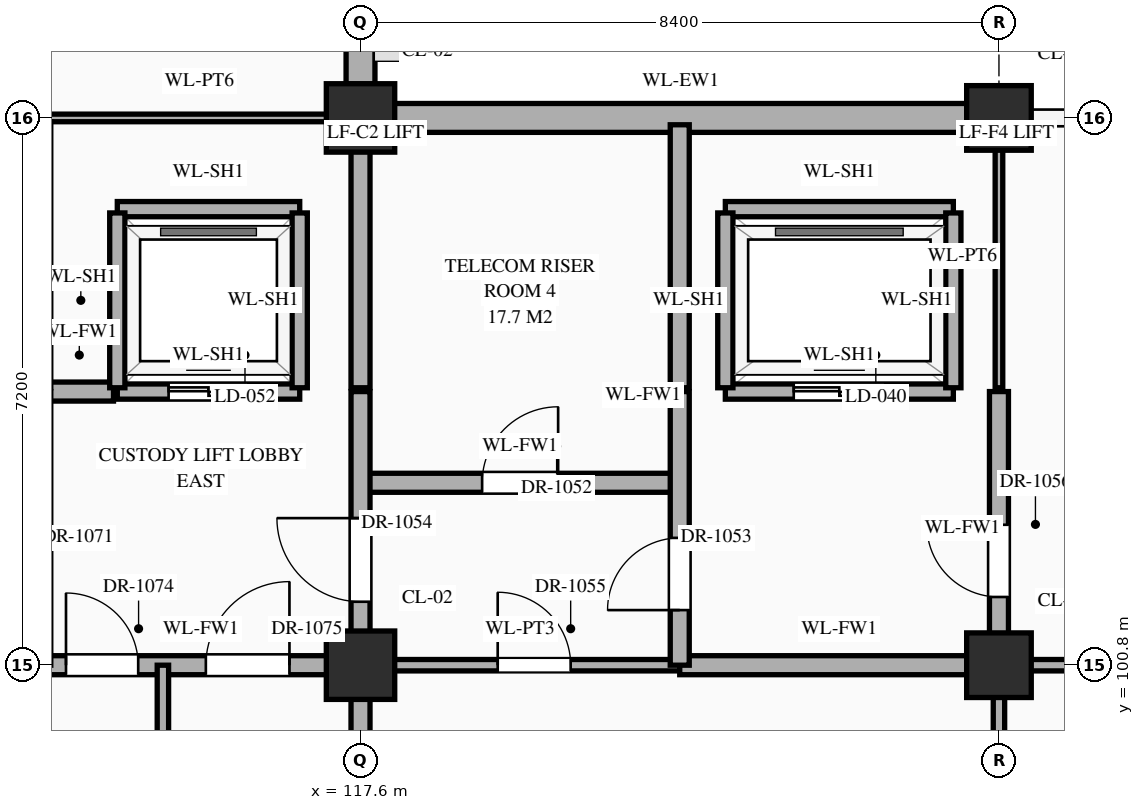
"""IFC4 building model, lengths in metres.
Left out: names, types, materials, properties, quantities, classifications, styles, units other than length and angle.
Written with IfcOpenShell. Run it as: python <this file> out.ifc"""

import sys

from ifc_helpers import new_model, si_unit, direction, frame, frame_2d, origin, origin_2d, place, context, subcontext, project, spatial, rectangle, extrude, element, fill, save


model = new_model("IFC4")
c1 = context("Model", 3, precision=1e-05, world=origin(), true_north=direction((0.0, 1.0)))
c2 = subcontext(c1, "Body", "Model", "MODEL_VIEW")
j1 = project(units=[si_unit("LENGTHUNIT", "METRE"), si_unit("PLANEANGLEUNIT", "RADIAN")], contexts=[c1])
p1 = place(None, origin())
s1 = spatial("IfcSite", under=j1, at=p1, CompositionType="ELEMENT")
p2 = place(p1, origin())
s2 = spatial("IfcBuilding", under=s1, at=p2, CompositionType="ELEMENT")
p3 = place(p2, frame((0.0, 0.0, 5.4)))
s3 = spatial("IfcBuildingStorey", under=s2, at=p3, CompositionType="ELEMENT", Elevation=5.4)
for number, where, z_axis, x_axis in (
    (1, (117.6, 100.8, 0.0), (0.0, 0.0, 1.0), (1.0, 0.0, 0.0)),
    (2, (117.6, 108.0, 0.0), (0.0, 0.0, 1.0), (1.0, 0.0, 0.0)),
):
    element("IfcColumn", number, at=place(p3, frame(where, z_axis=z_axis, x_axis=x_axis)), inside=s3, PredefinedType="COLUMN", context=c2, shape_type="SweptSolid", body=[
        extrude(rectangle(XDim=0.9, YDim=0.9, at=origin_2d()), origin(), (0.0, 0.0, 1.0), 5.4),
    ])
for number, where, z_axis, x_axis in (
    (3, (126.0, 100.8, 0.0), (0.0, 0.0, 1.0), (1.0, 0.0, 0.0)),
    (4, (126.0, 108.0, 0.0), (0.0, 0.0, 1.0), (1.0, 0.0, 0.0)),
):
    element("IfcColumn", number, at=place(p3, frame(where, z_axis=z_axis, x_axis=x_axis)), inside=s3, PredefinedType="COLUMN", context=c2, shape_type="SweptSolid", body=[
        extrude(rectangle(XDim=0.85, YDim=0.85, at=origin_2d()), origin(), (0.0, 0.0, 1.0), 5.4),
    ])
p4 = place(p3, frame((117.6, 108.445, 0.0), z_axis=(0.0, 0.0, 1.0), x_axis=(0.0, 1.0, 0.0)))
e5 = element("IfcWall", 5, at=p4, inside=s3, PredefinedType="STANDARD", context=c2, shape_type="SweptSolid", body=[
    extrude(rectangle(XDim=6.335, YDim=0.38, at=frame_2d((3.167, 0.0))), origin(), (0.0, 0.0, 1.0), 4.47),
])
p5 = place(p4, frame((3.93, 0.0, 0.85)))
e6 = element("IfcOpeningElement", 6, at=p5, cuts=e5, PredefinedType="OPENING", context=c2, shape_type="SweptSolid", body=[
    extrude(rectangle(XDim=1.05, YDim=1.74, at=frame_2d((0.525, 0.87))), frame((0.0, 0.202, 0.0), z_axis=(0.0, -1.0, 0.0), x_axis=(1.0, 0.0, 0.0)), (0.0, 0.0, 1.0), 0.404),
])
p6 = place(p3, frame((118.045, 108.0, 0.0), z_axis=(0.0, 0.0, 1.0), x_axis=(1.0, 0.0, 0.0)))
e7 = element("IfcWall", 7, at=p6, inside=s3, PredefinedType="STANDARD", context=c2, shape_type="SweptSolid", body=[
    extrude(rectangle(XDim=7.535, YDim=0.38, at=frame_2d((3.768, 0.0))), origin(), (0.0, 0.0, 1.0), 4.47),
])
p7 = place(p3, frame((113.4, 100.8, 0.0), z_axis=(0.0, 0.0, 1.0), x_axis=(1.0, 0.0, 0.0)))
e8 = element("IfcWall", 8, at=p7, inside=s3, PredefinedType="STANDARD", context=c2, shape_type="SweptSolid", body=[
    extrude(rectangle(XDim=4.2, YDim=0.25, at=frame_2d((2.1, 0.0))), origin(), (0.0, 0.0, 1.0), 4.27),
])
p8 = place(p7, frame((0.325, 0.0, 0.0)))
e9 = element("IfcOpeningElement", 9, at=p8, cuts=e8, PredefinedType="OPENING", context=c2, shape_type="SweptSolid", body=[
    extrude(rectangle(XDim=0.95, YDim=2.15, at=frame_2d((0.475, 1.075))), frame((0.0, 0.137, 0.0), z_axis=(0.0, -1.0, 0.0), x_axis=(1.0, 0.0, 0.0)), (0.0, 0.0, 1.0), 0.274),
])
p9 = place(p7, frame((2.165, 0.0, 0.0)))
e10 = element("IfcOpeningElement", 10, at=p9, cuts=e8, PredefinedType="OPENING", context=c2, shape_type="SweptSolid", body=[
    extrude(rectangle(XDim=1.1, YDim=2.2, at=frame_2d((0.55, 1.1))), frame((0.0, 0.137, 0.0), z_axis=(0.0, -1.0, 0.0), x_axis=(1.0, 0.0, 0.0)), (0.0, 0.0, 1.0), 0.274),
])
p10 = place(p3, frame((117.6, 100.8, 0.0), z_axis=(0.0, 0.0, 1.0), x_axis=(1.0, 0.0, 0.0)))
e11 = element("IfcWall", 11, at=p10, inside=s3, PredefinedType="STANDARD", context=c2, shape_type="SweptSolid", body=[
    extrude(rectangle(XDim=4.2, YDim=0.15, at=frame_2d((2.1, 0.0))), origin(), (0.0, 0.0, 1.0), 4.27),
])
p11 = place(p10, frame((1.805, 0.0, 0.0)))
e12 = element("IfcOpeningElement", 12, at=p11, cuts=e11, PredefinedType="OPENING", context=c2, shape_type="SweptSolid", body=[
    extrude(rectangle(XDim=0.96, YDim=2.2, at=frame_2d((0.48, 1.1))), frame((0.0, 0.087, 0.0), z_axis=(0.0, -1.0, 0.0), x_axis=(1.0, 0.0, 0.0)), (0.0, 0.0, 1.0), 0.174),
])
p12 = place(p3, frame((121.8, 100.8, 0.0), z_axis=(0.0, 0.0, 1.0), x_axis=(1.0, 0.0, 0.0)))
e13 = element("IfcWall", 13, at=p12, inside=s3, PredefinedType="STANDARD", context=c2, shape_type="SweptSolid", body=[
    extrude(rectangle(XDim=4.2, YDim=0.25, at=frame_2d((2.1, 0.0))), origin(), (0.0, 0.0, 1.0), 4.27),
])
p13 = place(p3, frame((126.0, 100.8, 0.0), z_axis=(0.0, 0.0, 1.0), x_axis=(1.0, 0.0, 0.0)))
e14 = element("IfcWall", 14, at=p13, inside=s3, PredefinedType="STANDARD", context=c2, shape_type="SweptSolid", body=[
    extrude(rectangle(XDim=8.4, YDim=0.15, at=frame_2d((4.2, 0.0))), origin(), (0.0, 0.0, 1.0), 4.27),
])
p14 = place(p13, frame((3.6, 0.0, 0.0)))
e15 = element("IfcOpeningElement", 15, at=p14, cuts=e14, PredefinedType="OPENING", context=c2, shape_type="SweptSolid", body=[
    extrude(rectangle(XDim=1.2, YDim=2.35, at=frame_2d((0.6, 1.175))), frame((0.0, 0.087, 0.0), z_axis=(0.0, -1.0, 0.0), x_axis=(1.0, 0.0, 0.0)), (0.0, 0.0, 1.0), 0.174),
])
p15 = place(p3, frame((117.6, 103.2, 0.0), z_axis=(0.0, 0.0, 1.0), x_axis=(1.0, 0.0, 0.0)))
e16 = element("IfcWall", 16, at=p15, inside=s3, PredefinedType="STANDARD", context=c2, shape_type="SweptSolid", body=[
    extrude(rectangle(XDim=4.2, YDim=0.25, at=frame_2d((2.1, 0.0))), origin(), (0.0, 0.0, 1.0), 5.12),
])
p16 = place(p15, frame((1.6, 0.0, 0.0)))
e17 = element("IfcOpeningElement", 17, at=p16, cuts=e16, PredefinedType="OPENING", context=c2, shape_type="SweptSolid", body=[
    extrude(rectangle(XDim=1.0, YDim=2.2, at=frame_2d((0.5, 1.1))), frame((0.0, 0.137, 0.0), z_axis=(0.0, -1.0, 0.0), x_axis=(1.0, 0.0, 0.0)), (0.0, 0.0, 1.0), 0.274),
])
p17 = place(p3, frame((126.0, 103.2, 0.0), z_axis=(0.0, 0.0, 1.0), x_axis=(1.0, 0.0, 0.0)))
e18 = element("IfcWall", 18, at=p17, inside=s3, PredefinedType="STANDARD", context=c2, shape_type="SweptSolid", body=[
    extrude(rectangle(XDim=41.96, YDim=0.1, at=frame_2d((20.98, 0.0))), origin(), (0.0, 0.0, 1.0), 5.12),
])
p18 = place(p17, frame((3.7, 0.0, 0.0)))
e19 = element("IfcOpeningElement", 19, at=p18, cuts=e18, PredefinedType="OPENING", context=c2, shape_type="SweptSolid", body=[
    extrude(rectangle(XDim=1.0, YDim=2.25, at=frame_2d((0.5, 1.125))), frame((0.0, 0.062, 0.0), z_axis=(0.0, -1.0, 0.0), x_axis=(1.0, 0.0, 0.0)), (0.0, 0.0, 1.0), 0.124),
])
p19 = place(p17, frame((12.08, 0.0, 0.0)))
e20 = element("IfcOpeningElement", 20, at=p19, cuts=e18, PredefinedType="OPENING", context=c2, shape_type="SweptSolid", body=[
    extrude(rectangle(XDim=1.04, YDim=2.2, at=frame_2d((0.52, 1.1))), frame((0.0, 0.062, 0.0), z_axis=(0.0, -1.0, 0.0), x_axis=(1.0, 0.0, 0.0)), (0.0, 0.0, 1.0), 0.124),
])
p20 = place(p17, frame((20.46, 0.0, 0.0)))
e21 = element("IfcOpeningElement", 21, at=p20, cuts=e18, PredefinedType="OPENING", context=c2, shape_type="SweptSolid", body=[
    extrude(rectangle(XDim=1.08, YDim=2.25, at=frame_2d((0.54, 1.125))), frame((0.0, 0.062, 0.0), z_axis=(0.0, -1.0, 0.0), x_axis=(1.0, 0.0, 0.0)), (0.0, 0.0, 1.0), 0.124),
])
p21 = place(p17, frame((28.84, 0.0, 0.0)))
e22 = element("IfcOpeningElement", 22, at=p21, cuts=e18, PredefinedType="OPENING", context=c2, shape_type="SweptSolid", body=[
    extrude(rectangle(XDim=1.12, YDim=2.25, at=frame_2d((0.56, 1.125))), frame((0.0, 0.062, 0.0), z_axis=(0.0, -1.0, 0.0), x_axis=(1.0, 0.0, 0.0)), (0.0, 0.0, 1.0), 0.124),
])
p22 = place(p17, frame((37.2, 0.0, 0.0)))
e23 = element("IfcOpeningElement", 23, at=p22, cuts=e18, PredefinedType="OPENING", context=c2, shape_type="SweptSolid", body=[
    extrude(rectangle(XDim=1.16, YDim=2.3, at=frame_2d((0.58, 1.15))), frame((0.0, 0.062, 0.0), z_axis=(0.0, -1.0, 0.0), x_axis=(1.0, 0.0, 0.0)), (0.0, 0.0, 1.0), 0.124),
])
p23 = place(p3, frame((113.45, 104.4, 0.0), z_axis=(0.0, 0.0, 1.0), x_axis=(1.0, 0.0, 0.0)))
e24 = element("IfcWall", 24, at=p23, inside=s3, PredefinedType="STANDARD", context=c2, shape_type="SweptSolid", body=[
    extrude(rectangle(XDim=0.9, YDim=0.25, at=frame_2d((0.45, 0.0))), origin(), (0.0, 0.0, 1.0), 5.12),
])
p24 = place(p3, frame((114.4, 104.4, 0.0), z_axis=(0.0, 0.0, 1.0), x_axis=(1.0, 0.0, 0.0)))
e25 = element("IfcWall", 25, at=p24, inside=s3, PredefinedType="STANDARD", context=c2, shape_type="SweptSolid", body=[
    extrude(rectangle(XDim=2.4, YDim=0.2, at=frame_2d((1.2, 0.0))), origin(), (0.0, 0.0, 1.0), 5.12),
])
p25 = place(p24, frame((0.675, 0.0, 0.0)))
e26 = element("IfcOpeningElement", 26, at=p25, cuts=e25, PredefinedType="OPENING", context=c2, shape_type="SweptSolid", body=[
    extrude(rectangle(XDim=1.05, YDim=2.15, at=frame_2d((0.525, 1.075))), frame((0.0, 0.112, 0.0), z_axis=(0.0, -1.0, 0.0), x_axis=(1.0, 0.0, 0.0)), (0.0, 0.0, 1.0), 0.224),
])
p26 = place(p3, frame((122.4, 104.4, 0.0), z_axis=(0.0, 0.0, 1.0), x_axis=(1.0, 0.0, 0.0)))
e27 = element("IfcWall", 27, at=p26, inside=s3, PredefinedType="STANDARD", context=c2, shape_type="SweptSolid", body=[
    extrude(rectangle(XDim=3.0, YDim=0.2, at=frame_2d((1.5, 0.0))), origin(), (0.0, 0.0, 1.0), 5.12),
])
p27 = place(p26, frame((0.9, 0.0, 0.0)))
e28 = element("IfcOpeningElement", 28, at=p27, cuts=e27, PredefinedType="OPENING", context=c2, shape_type="SweptSolid", body=[
    extrude(rectangle(XDim=1.2, YDim=2.15, at=frame_2d((0.6, 1.075))), frame((0.0, 0.112, 0.0), z_axis=(0.0, -1.0, 0.0), x_axis=(1.0, 0.0, 0.0)), (0.0, 0.0, 1.0), 0.224),
])
p28 = place(p3, frame((114.4, 106.8, 0.0), z_axis=(0.0, 0.0, 1.0), x_axis=(1.0, 0.0, 0.0)))
e29 = element("IfcWall", 29, at=p28, inside=s3, PredefinedType="STANDARD", context=c2, shape_type="SweptSolid", body=[
    extrude(rectangle(XDim=2.4, YDim=0.2, at=frame_2d((1.2, 0.0))), origin(), (0.0, 0.0, 1.0), 5.12),
])
p29 = place(p3, frame((122.4, 106.8, 0.0), z_axis=(0.0, 0.0, 1.0), x_axis=(1.0, 0.0, 0.0)))
e30 = element("IfcWall", 30, at=p29, inside=s3, PredefinedType="STANDARD", context=c2, shape_type="SweptSolid", body=[
    extrude(rectangle(XDim=3.0, YDim=0.2, at=frame_2d((1.5, 0.0))), origin(), (0.0, 0.0, 1.0), 5.12),
])
p30 = place(p3, frame((113.45, 108.0, 0.0), z_axis=(0.0, 0.0, 1.0), x_axis=(1.0, 0.0, 0.0)))
e31 = element("IfcWall", 31, at=p30, inside=s3, PredefinedType="STANDARD", context=c2, shape_type="SweptSolid", body=[
    extrude(rectangle(XDim=4.06, YDim=0.1, at=frame_2d((2.03, 0.0))), origin(), (0.0, 0.0, 1.0), 4.27),
])
p31 = place(p3, frame((114.4, 104.45, 0.0), z_axis=(0.0, 0.0, 1.0), x_axis=(0.0, 1.0, 0.0)))
e32 = element("IfcWall", 32, at=p31, inside=s3, PredefinedType="STANDARD", context=c2, shape_type="SweptSolid", body=[
    extrude(rectangle(XDim=2.3, YDim=0.2, at=frame_2d((1.15, 0.0))), origin(), (0.0, 0.0, 1.0), 5.12),
])
p32 = place(p3, frame((115.0, 96.0, 0.0), z_axis=(0.0, 0.0, 1.0), x_axis=(0.0, 1.0, 0.0)))
e33 = element("IfcWall", 33, at=p32, inside=s3, PredefinedType="STANDARD", context=c2, shape_type="SweptSolid", body=[
    extrude(rectangle(XDim=4.8, YDim=0.15, at=frame_2d((2.4, 0.0))), origin(), (0.0, 0.0, 1.0), 5.12),
])
p33 = place(p32, frame((1.97, 0.0, 0.0)))
e34 = element("IfcOpeningElement", 34, at=p33, cuts=e33, PredefinedType="OPENING", context=c2, shape_type="SweptSolid", body=[
    extrude(rectangle(XDim=0.86, YDim=2.1, at=frame_2d((0.43, 1.05))), frame((0.0, 0.087, 0.0), z_axis=(0.0, -1.0, 0.0), x_axis=(1.0, 0.0, 0.0)), (0.0, 0.0, 1.0), 0.174),
])
p34 = place(p3, frame((116.8, 104.45, 0.0), z_axis=(0.0, 0.0, 1.0), x_axis=(0.0, 1.0, 0.0)))
e35 = element("IfcWall", 35, at=p34, inside=s3, PredefinedType="STANDARD", context=c2, shape_type="SweptSolid", body=[
    extrude(rectangle(XDim=2.3, YDim=0.2, at=frame_2d((1.15, 0.0))), origin(), (0.0, 0.0, 1.0), 5.12),
])
p35 = place(p3, frame((117.6, 91.2, 0.0), z_axis=(0.0, 0.0, 1.0), x_axis=(0.0, 1.0, 0.0)))
e36 = element("IfcWall", 36, at=p35, inside=s3, PredefinedType="STANDARD", context=c2, shape_type="SweptSolid", body=[
    extrude(rectangle(XDim=13.2, YDim=0.25, at=frame_2d((6.6, 0.0))), origin(), (0.0, 0.0, 1.0), 4.37),
])
p36 = place(p35, frame((0.515, 0.0, 0.0)))
e37 = element("IfcOpeningElement", 37, at=p36, cuts=e36, PredefinedType="OPENING", context=c2, shape_type="SweptSolid", body=[
    extrude(rectangle(XDim=1.0, YDim=2.2, at=frame_2d((0.5, 1.1))), frame((0.0, 0.137, 0.0), z_axis=(0.0, -1.0, 0.0), x_axis=(1.0, 0.0, 0.0)), (0.0, 0.0, 1.0), 0.274),
])
p37 = place(p35, frame((10.435, 0.0, 0.0)))
e38 = element("IfcOpeningElement", 38, at=p37, cuts=e36, PredefinedType="OPENING", context=c2, shape_type="SweptSolid", body=[
    extrude(rectangle(XDim=1.1, YDim=2.2, at=frame_2d((0.55, 1.1))), frame((0.0, 0.137, 0.0), z_axis=(0.0, -1.0, 0.0), x_axis=(1.0, 0.0, 0.0)), (0.0, 0.0, 1.0), 0.274),
])
p38 = place(p35, frame((3.285, 0.0, 0.0)))
e39 = element("IfcOpeningElement", 39, at=p38, cuts=e36, PredefinedType="OPENING", context=c2, shape_type="SweptSolid", body=[
    extrude(rectangle(XDim=1.0, YDim=2.2, at=frame_2d((0.5, 1.1))), frame((0.0, 0.137, 0.0), z_axis=(0.0, -1.0, 0.0), x_axis=(1.0, 0.0, 0.0)), (0.0, 0.0, 1.0), 0.274),
])
p39 = place(p3, frame((117.6, 104.45, 0.0), z_axis=(0.0, 0.0, 1.0), x_axis=(0.0, 1.0, 0.0)))
e40 = element("IfcWall", 40, at=p39, inside=s3, PredefinedType="STANDARD", context=c2, shape_type="SweptSolid", body=[
    extrude(rectangle(XDim=3.46, YDim=0.25, at=frame_2d((1.73, 0.0))), origin(), (0.0, 0.0, 1.0), 4.37),
])
p40 = place(p3, frame((121.8, 100.8, 0.0), z_axis=(0.0, 0.0, 1.0), x_axis=(0.0, 1.0, 0.0)))
e41 = element("IfcWall", 41, at=p40, inside=s3, PredefinedType="STANDARD", context=c2, shape_type="SweptSolid", body=[
    extrude(rectangle(XDim=3.6, YDim=0.25, at=frame_2d((1.8, 0.0))), origin(), (0.0, 0.0, 1.0), 4.72),
])
p41 = place(p40, frame((0.725, 0.0, 0.0)))
e42 = element("IfcOpeningElement", 42, at=p41, cuts=e41, PredefinedType="OPENING", context=c2, shape_type="SweptSolid", body=[
    extrude(rectangle(XDim=0.95, YDim=2.15, at=frame_2d((0.475, 1.075))), frame((0.0, 0.137, 0.0), z_axis=(0.0, -1.0, 0.0), x_axis=(1.0, 0.0, 0.0)), (0.0, 0.0, 1.0), 0.274),
])
p42 = place(p3, frame((121.8, 104.45, 0.0), z_axis=(0.0, 0.0, 1.0), x_axis=(0.0, 1.0, 0.0)))
e43 = element("IfcWall", 43, at=p42, inside=s3, PredefinedType="STANDARD", context=c2, shape_type="SweptSolid", body=[
    extrude(rectangle(XDim=3.46, YDim=0.25, at=frame_2d((1.73, 0.0))), origin(), (0.0, 0.0, 1.0), 4.72),
])
for number, where, z_axis, x_axis in (
    (44, (122.4, 104.45, 0.0), (0.0, 0.0, 1.0), (0.0, 1.0, 0.0)),
    (45, (125.4, 104.45, 0.0), (0.0, 0.0, 1.0), (0.0, 1.0, 0.0)),
):
    element("IfcWall", number, at=place(p3, frame(where, z_axis=z_axis, x_axis=x_axis)), inside=s3, PredefinedType="STANDARD", context=c2, shape_type="SweptSolid", body=[
        extrude(rectangle(XDim=2.3, YDim=0.2, at=frame_2d((1.15, 0.0))), origin(), (0.0, 0.0, 1.0), 5.12),
    ])
p43 = place(p3, frame((126.0, 96.0, 0.0), z_axis=(0.0, 0.0, 1.0), x_axis=(0.0, 1.0, 0.0)))
e46 = element("IfcWall", 46, at=p43, inside=s3, PredefinedType="STANDARD", context=c2, shape_type="SweptSolid", body=[
    extrude(rectangle(XDim=4.8, YDim=0.15, at=frame_2d((2.4, 0.0))), origin(), (0.0, 0.0, 1.0), 4.37),
])
p44 = place(p3, frame((126.0, 100.8, 0.0), z_axis=(0.0, 0.0, 1.0), x_axis=(0.0, 1.0, 0.0)))
e47 = element("IfcWall", 47, at=p44, inside=s3, PredefinedType="STANDARD", context=c2, shape_type="SweptSolid", body=[
    extrude(rectangle(XDim=3.6, YDim=0.25, at=frame_2d((1.8, 0.0))), origin(), (0.0, 0.0, 1.0), 4.37),
])
p45 = place(p44, frame((0.897, 0.0, 0.0)))
e48 = element("IfcOpeningElement", 48, at=p45, cuts=e47, PredefinedType="OPENING", context=c2, shape_type="SweptSolid", body=[
    extrude(rectangle(XDim=0.95, YDim=2.15, at=frame_2d((0.475, 1.075))), frame((0.0, 0.137, 0.0), z_axis=(0.0, -1.0, 0.0), x_axis=(1.0, 0.0, 0.0)), (0.0, 0.0, 1.0), 0.274),
])
p46 = place(p3, frame((126.0, 104.45, 0.0), z_axis=(0.0, 0.0, 1.0), x_axis=(0.0, 1.0, 0.0)))
e49 = element("IfcWall", 49, at=p46, inside=s3, PredefinedType="STANDARD", context=c2, shape_type="SweptSolid", body=[
    extrude(rectangle(XDim=3.46, YDim=0.1, at=frame_2d((1.73, 0.0))), origin(), (0.0, 0.0, 1.0), 4.37),
])
p47 = place(p27, origin())
e50 = element("IfcDoor", 50, at=p47, inside=s3, OperationType="DOUBLE_DOOR_SLIDING", PredefinedType="DOOR", context=c2, shape_type="SweptSolid", body=[
    extrude(rectangle(XDim=1.2, YDim=2.15, at=frame_2d((0.6, 1.075))), frame((0.0, 0.025, 0.0), z_axis=(0.0, -1.0, 0.0), x_axis=(1.0, 0.0, 0.0)), (0.0, 0.0, 1.0), 0.05),
])
fill(e28, e50)
p48 = place(p25, origin())
e51 = element("IfcDoor", 51, at=p48, inside=s3, OperationType="DOUBLE_DOOR_SLIDING", PredefinedType="DOOR", context=c2, shape_type="SweptSolid", body=[
    extrude(rectangle(XDim=1.05, YDim=2.15, at=frame_2d((0.525, 1.075))), frame((0.0, 0.025, 0.0), z_axis=(0.0, -1.0, 0.0), x_axis=(1.0, 0.0, 0.0)), (0.0, 0.0, 1.0), 0.05),
])
fill(e26, e51)
p49 = place(p16, origin())
e52 = element("IfcDoor", 52, at=p49, inside=s3, OperationType="SINGLE_SWING_RIGHT", PredefinedType="DOOR", context=c2, shape_type="SweptSolid", body=[
    extrude(rectangle(XDim=1.0, YDim=2.2, at=frame_2d((0.5, 1.1))), frame((0.0, 0.025, 0.0), z_axis=(0.0, -1.0, 0.0), x_axis=(1.0, 0.0, 0.0)), (0.0, 0.0, 1.0), 0.05),
])
fill(e17, e52)
p50 = place(p41, origin())
e53 = element("IfcDoor", 53, at=p50, inside=s3, OperationType="SINGLE_SWING_LEFT", PredefinedType="DOOR", context=c2, shape_type="SweptSolid", body=[
    extrude(rectangle(XDim=0.95, YDim=2.15, at=frame_2d((0.475, 1.075))), frame((0.0, 0.025, 0.0), z_axis=(0.0, -1.0, 0.0), x_axis=(1.0, 0.0, 0.0)), (0.0, 0.0, 1.0), 0.05),
])
fill(e42, e53)
p51 = place(p37, origin())
e54 = element("IfcDoor", 54, at=p51, inside=s3, OperationType="SINGLE_SWING_RIGHT", PredefinedType="DOOR", context=c2, shape_type="SweptSolid", body=[
    extrude(rectangle(XDim=1.1, YDim=2.2, at=frame_2d((0.55, 1.1))), frame((0.0, 0.025, 0.0), z_axis=(0.0, -1.0, 0.0), x_axis=(1.0, 0.0, 0.0)), (0.0, 0.0, 1.0), 0.05),
])
fill(e38, e54)
p52 = place(p11, origin())
e55 = element("IfcDoor", 55, at=p52, inside=s3, OperationType="SINGLE_SWING_LEFT", PredefinedType="DOOR", context=c2, shape_type="SweptSolid", body=[
    extrude(rectangle(XDim=0.96, YDim=2.2, at=frame_2d((0.48, 1.1))), frame((0.0, 0.025, 0.0), z_axis=(0.0, -1.0, 0.0), x_axis=(1.0, 0.0, 0.0)), (0.0, 0.0, 1.0), 0.05),
])
fill(e12, e55)
p53 = place(p45, origin())
e56 = element("IfcDoor", 56, at=p53, inside=s3, OperationType="SINGLE_SWING_RIGHT", PredefinedType="DOOR", context=c2, shape_type="SweptSolid", body=[
    extrude(rectangle(XDim=0.95, YDim=2.15, at=frame_2d((0.475, 1.075))), frame((0.0, 0.025, 0.0), z_axis=(0.0, -1.0, 0.0), x_axis=(1.0, 0.0, 0.0)), (0.0, 0.0, 1.0), 0.05),
])
fill(e48, e56)
p54 = place(p8, origin())
e57 = element("IfcDoor", 57, at=p54, inside=s3, OperationType="SINGLE_SWING_LEFT", PredefinedType="DOOR", context=c2, shape_type="SweptSolid", body=[
    extrude(rectangle(XDim=0.95, YDim=2.15, at=frame_2d((0.475, 1.075))), frame((0.0, 0.025, 0.0), z_axis=(0.0, -1.0, 0.0), x_axis=(1.0, 0.0, 0.0)), (0.0, 0.0, 1.0), 0.05),
])
fill(e9, e57)
p55 = place(p9, origin())
e58 = element("IfcDoor", 58, at=p55, inside=s3, OperationType="SINGLE_SWING_RIGHT", PredefinedType="DOOR", context=c2, shape_type="SweptSolid", body=[
    extrude(rectangle(XDim=1.1, YDim=2.2, at=frame_2d((0.55, 1.1))), frame((0.0, 0.025, 0.0), z_axis=(0.0, -1.0, 0.0), x_axis=(1.0, 0.0, 0.0)), (0.0, 0.0, 1.0), 0.05),
])
fill(e10, e58)
save(model, sys.argv[1])
